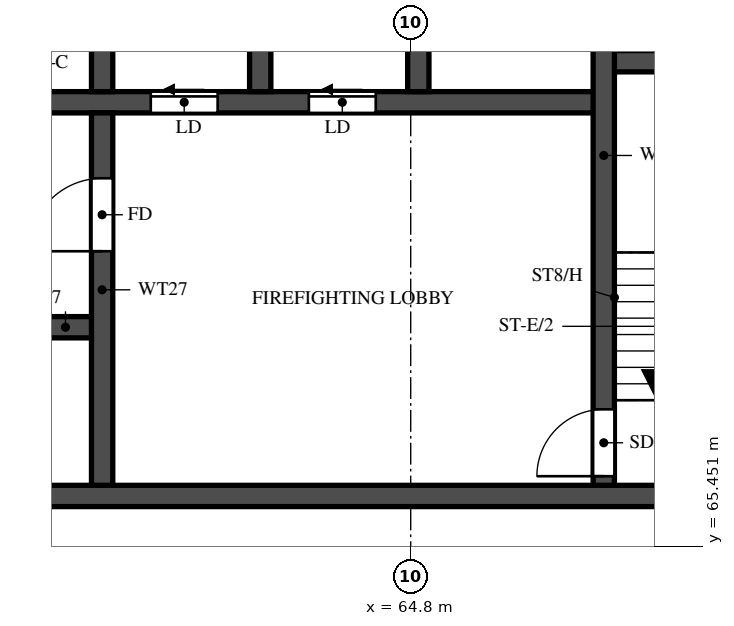
"""IFC4 building model, lengths in metres.
Left out: names, types, materials, properties, quantities, classifications, styles, units other than length and angle.
Written with IfcOpenShell. Run it as: python <this file> out.ifc"""

import sys

from ifc_helpers import new_model, si_unit, direction, frame, frame_2d, origin, place, context, subcontext, project, spatial, rectangle, extrude, element, fill, save


model = new_model("IFC4")
c1 = context("Model", 3, precision=1e-05, world=origin(), true_north=direction((0.0, 1.0)))
c2 = subcontext(c1, "Body", "Model", "MODEL_VIEW")
j1 = project(units=[si_unit("LENGTHUNIT", "METRE"), si_unit("PLANEANGLEUNIT", "RADIAN")], contexts=[c1])
p1 = place(None, origin())
s1 = spatial("IfcSite", under=j1, at=p1, CompositionType="ELEMENT")
p2 = place(p1, origin())
s2 = spatial("IfcBuilding", under=s1, at=p2, CompositionType="ELEMENT")
p3 = place(p2, frame((0.0, 0.0, 192.0)))
s3 = spatial("IfcBuildingStorey", under=s2, at=p3, CompositionType="ELEMENT", Elevation=192.0)
p4 = place(p3, frame((29.7, 66.275, 0.0), z_axis=(0.0, 0.0, 1.0), x_axis=(1.0, 0.0, 0.0)))
e1 = element("IfcWall", 1, at=p4, inside=s3, PredefinedType="SHEAR", context=c2, shape_type="SweptSolid", body=[
    extrude(rectangle(XDim=41.4, YDim=0.35, at=frame_2d((20.7, 0.0))), origin(), (0.0, 0.0, 1.0), 3.2),
])
p5 = place(p4, frame((0.925, 0.0, 0.0)))
e2 = element("IfcOpeningElement", 2, at=p5, cuts=e1, PredefinedType="OPENING", context=c2, shape_type="SweptSolid", body=[
    extrude(rectangle(XDim=1.1, YDim=2.1, at=frame_2d((0.55, 1.05))), frame((0.0, 0.185, 0.0), z_axis=(0.0, -1.0, 0.0), x_axis=(1.0, 0.0, 0.0)), (0.0, 0.0, 1.0), 0.37),
])
p6 = place(p4, frame((3.712, 0.0, 0.0)))
e3 = element("IfcOpeningElement", 3, at=p6, cuts=e1, PredefinedType="OPENING", context=c2, shape_type="SweptSolid", body=[
    extrude(rectangle(XDim=1.8, YDim=2.1, at=frame_2d((0.9, 1.05))), frame((0.0, 0.185, 0.0), z_axis=(0.0, -1.0, 0.0), x_axis=(1.0, 0.0, 0.0)), (0.0, 0.0, 1.0), 0.37),
])
p7 = place(p3, frame((35.625, 69.05, 0.0), z_axis=(0.0, 0.0, 1.0), x_axis=(1.0, 0.0, 0.0)))
e4 = element("IfcWall", 4, at=p7, inside=s3, PredefinedType="SHEAR", context=c2, shape_type="SweptSolid", body=[
    extrude(rectangle(XDim=24.1, YDim=0.35, at=frame_2d((12.05, 0.0))), origin(), (0.0, 0.0, 1.0), 3.2),
])
p8 = place(p7, frame((1.0, 0.0, 0.0)))
e5 = element("IfcOpeningElement", 5, at=p8, cuts=e4, PredefinedType="OPENING", context=c2, shape_type="SweptSolid", body=[
    extrude(rectangle(XDim=1.1, YDim=2.1, at=frame_2d((0.55, 1.05))), frame((0.0, 0.185, 0.0), z_axis=(0.0, -1.0, 0.0), x_axis=(1.0, 0.0, 0.0)), (0.0, 0.0, 1.0), 0.37),
])
p9 = place(p7, frame((3.75, 0.0, 0.0)))
e6 = element("IfcOpeningElement", 6, at=p9, cuts=e4, PredefinedType="OPENING", context=c2, shape_type="SweptSolid", body=[
    extrude(rectangle(XDim=1.1, YDim=2.1, at=frame_2d((0.55, 1.05))), frame((0.0, 0.185, 0.0), z_axis=(0.0, -1.0, 0.0), x_axis=(1.0, 0.0, 0.0)), (0.0, 0.0, 1.0), 0.37),
])
p10 = place(p7, frame((6.5, 0.0, 0.0)))
e7 = element("IfcOpeningElement", 7, at=p10, cuts=e4, PredefinedType="OPENING", context=c2, shape_type="SweptSolid", body=[
    extrude(rectangle(XDim=1.1, YDim=2.1, at=frame_2d((0.55, 1.05))), frame((0.0, 0.185, 0.0), z_axis=(0.0, -1.0, 0.0), x_axis=(1.0, 0.0, 0.0)), (0.0, 0.0, 1.0), 0.37),
])
p11 = place(p7, frame((9.25, 0.0, 0.0)))
e8 = element("IfcOpeningElement", 8, at=p11, cuts=e4, PredefinedType="OPENING", context=c2, shape_type="SweptSolid", body=[
    extrude(rectangle(XDim=1.1, YDim=2.1, at=frame_2d((0.55, 1.05))), frame((0.0, 0.185, 0.0), z_axis=(0.0, -1.0, 0.0), x_axis=(1.0, 0.0, 0.0)), (0.0, 0.0, 1.0), 0.37),
])
p12 = place(p7, frame((12.0, 0.0, 0.0)))
e9 = element("IfcOpeningElement", 9, at=p12, cuts=e4, PredefinedType="OPENING", context=c2, shape_type="SweptSolid", body=[
    extrude(rectangle(XDim=1.1, YDim=2.1, at=frame_2d((0.55, 1.05))), frame((0.0, 0.185, 0.0), z_axis=(0.0, -1.0, 0.0), x_axis=(1.0, 0.0, 0.0)), (0.0, 0.0, 1.0), 0.37),
])
p13 = place(p7, frame((14.75, 0.0, 0.0)))
e10 = element("IfcOpeningElement", 10, at=p13, cuts=e4, PredefinedType="OPENING", context=c2, shape_type="SweptSolid", body=[
    extrude(rectangle(XDim=1.1, YDim=2.1, at=frame_2d((0.55, 1.05))), frame((0.0, 0.185, 0.0), z_axis=(0.0, -1.0, 0.0), x_axis=(1.0, 0.0, 0.0)), (0.0, 0.0, 1.0), 0.37),
])
p14 = place(p7, frame((17.625, 0.0, 0.0)))
e11 = element("IfcOpeningElement", 11, at=p14, cuts=e4, PredefinedType="OPENING", context=c2, shape_type="SweptSolid", body=[
    extrude(rectangle(XDim=1.1, YDim=2.1, at=frame_2d((0.55, 1.05))), frame((0.0, 0.185, 0.0), z_axis=(0.0, -1.0, 0.0), x_axis=(1.0, 0.0, 0.0)), (0.0, 0.0, 1.0), 0.37),
])
p15 = place(p7, frame((20.625, 0.0, 0.0)))
e12 = element("IfcOpeningElement", 12, at=p15, cuts=e4, PredefinedType="OPENING", context=c2, shape_type="SweptSolid", body=[
    extrude(rectangle(XDim=1.1, YDim=2.1, at=frame_2d((0.55, 1.05))), frame((0.0, 0.185, 0.0), z_axis=(0.0, -1.0, 0.0), x_axis=(1.0, 0.0, 0.0)), (0.0, 0.0, 1.0), 0.37),
])
p16 = place(p3, frame((32.825, 72.75, 0.0), z_axis=(0.0, 0.0, 1.0), x_axis=(1.0, 0.0, 0.0)))
e13 = element("IfcWall", 13, at=p16, inside=s3, PredefinedType="SHEAR", context=c2, shape_type="SweptSolid", body=[
    extrude(rectangle(XDim=35.15, YDim=0.35, at=frame_2d((17.575, 0.0))), origin(), (0.0, 0.0, 1.0), 3.2),
])
p17 = place(p16, frame((19.8, 0.0, 0.0)))
e14 = element("IfcOpeningElement", 14, at=p17, cuts=e13, PredefinedType="OPENING", context=c2, shape_type="SweptSolid", body=[
    extrude(rectangle(XDim=1.1, YDim=2.1, at=frame_2d((0.55, 1.05))), frame((0.0, 0.185, 0.0), z_axis=(0.0, -1.0, 0.0), x_axis=(1.0, 0.0, 0.0)), (0.0, 0.0, 1.0), 0.37),
])
p18 = place(p16, frame((27.7, 0.0, 0.0)))
e15 = element("IfcOpeningElement", 15, at=p18, cuts=e13, PredefinedType="OPENING", context=c2, shape_type="SweptSolid", body=[
    extrude(rectangle(XDim=1.1, YDim=2.1, at=frame_2d((0.55, 1.05))), frame((0.0, 0.185, 0.0), z_axis=(0.0, -1.0, 0.0), x_axis=(1.0, 0.0, 0.0)), (0.0, 0.0, 1.0), 0.37),
])
p19 = place(p16, frame((30.3, 0.0, 0.0)))
e16 = element("IfcOpeningElement", 16, at=p19, cuts=e13, PredefinedType="OPENING", context=c2, shape_type="SweptSolid", body=[
    extrude(rectangle(XDim=1.1, YDim=2.1, at=frame_2d((0.55, 1.05))), frame((0.0, 0.185, 0.0), z_axis=(0.0, -1.0, 0.0), x_axis=(1.0, 0.0, 0.0)), (0.0, 0.0, 1.0), 0.37),
])
p20 = place(p16, frame((3.8, 0.0, 0.0)))
e17 = element("IfcOpeningElement", 17, at=p20, cuts=e13, PredefinedType="OPENING", context=c2, shape_type="SweptSolid", body=[
    extrude(rectangle(XDim=1.1, YDim=2.1, at=frame_2d((0.55, 1.05))), frame((0.0, 0.185, 0.0), z_axis=(0.0, -1.0, 0.0), x_axis=(1.0, 0.0, 0.0)), (0.0, 0.0, 1.0), 0.37),
])
p21 = place(p16, frame((6.55, 0.0, 0.0)))
e18 = element("IfcOpeningElement", 18, at=p21, cuts=e13, PredefinedType="OPENING", context=c2, shape_type="SweptSolid", body=[
    extrude(rectangle(XDim=1.1, YDim=2.1, at=frame_2d((0.55, 1.05))), frame((0.0, 0.185, 0.0), z_axis=(0.0, -1.0, 0.0), x_axis=(1.0, 0.0, 0.0)), (0.0, 0.0, 1.0), 0.37),
])
p22 = place(p16, frame((9.3, 0.0, 0.0)))
e19 = element("IfcOpeningElement", 19, at=p22, cuts=e13, PredefinedType="OPENING", context=c2, shape_type="SweptSolid", body=[
    extrude(rectangle(XDim=1.1, YDim=2.1, at=frame_2d((0.55, 1.05))), frame((0.0, 0.185, 0.0), z_axis=(0.0, -1.0, 0.0), x_axis=(1.0, 0.0, 0.0)), (0.0, 0.0, 1.0), 0.37),
])
p23 = place(p16, frame((12.05, 0.0, 0.0)))
e20 = element("IfcOpeningElement", 20, at=p23, cuts=e13, PredefinedType="OPENING", context=c2, shape_type="SweptSolid", body=[
    extrude(rectangle(XDim=1.1, YDim=2.1, at=frame_2d((0.55, 1.05))), frame((0.0, 0.185, 0.0), z_axis=(0.0, -1.0, 0.0), x_axis=(1.0, 0.0, 0.0)), (0.0, 0.0, 1.0), 0.37),
])
p24 = place(p16, frame((14.8, 0.0, 0.0)))
e21 = element("IfcOpeningElement", 21, at=p24, cuts=e13, PredefinedType="OPENING", context=c2, shape_type="SweptSolid", body=[
    extrude(rectangle(XDim=1.1, YDim=2.1, at=frame_2d((0.55, 1.05))), frame((0.0, 0.185, 0.0), z_axis=(0.0, -1.0, 0.0), x_axis=(1.0, 0.0, 0.0)), (0.0, 0.0, 1.0), 0.37),
])
p25 = place(p16, frame((17.55, 0.0, 0.0)))
e22 = element("IfcOpeningElement", 22, at=p25, cuts=e13, PredefinedType="OPENING", context=c2, shape_type="SweptSolid", body=[
    extrude(rectangle(XDim=1.1, YDim=2.1, at=frame_2d((0.55, 1.05))), frame((0.0, 0.185, 0.0), z_axis=(0.0, -1.0, 0.0), x_axis=(1.0, 0.0, 0.0)), (0.0, 0.0, 1.0), 0.37),
])
p26 = place(p16, frame((0.938, 0.0, 0.0)))
e23 = element("IfcOpeningElement", 23, at=p26, cuts=e13, PredefinedType="OPENING", context=c2, shape_type="SweptSolid", body=[
    extrude(rectangle(XDim=1.1, YDim=2.1, at=frame_2d((0.55, 1.05))), frame((0.0, 0.185, 0.0), z_axis=(0.0, -1.0, 0.0), x_axis=(1.0, 0.0, 0.0)), (0.0, 0.0, 1.0), 0.37),
])
p27 = place(p3, frame((67.975, 73.425, 0.0), z_axis=(0.0, 0.0, 1.0), x_axis=(1.0, 0.0, 0.0)))
e24 = element("IfcWall", 24, at=p27, inside=s3, PredefinedType="SHEAR", context=c2, shape_type="SweptSolid", body=[
    extrude(rectangle(XDim=3.125, YDim=0.35, at=frame_2d((1.562, 0.0))), origin(), (0.0, 0.0, 1.0), 3.2),
])
p28 = place(p3, frame((67.975, 66.45, 0.0), z_axis=(0.0, 0.0, 1.0), x_axis=(0.0, 1.0, 0.0)))
e25 = element("IfcWall", 25, at=p28, inside=s3, PredefinedType="SHEAR", context=c2, shape_type="SweptSolid", body=[
    extrude(rectangle(XDim=10.85, YDim=0.35, at=frame_2d((5.425, 0.0))), origin(), (0.0, 0.0, 1.0), 3.2),
])
p29 = place(p28, frame((0.15, 0.0, 0.0)))
e26 = element("IfcOpeningElement", 26, at=p29, cuts=e25, PredefinedType="OPENING", context=c2, shape_type="SweptSolid", body=[
    extrude(rectangle(XDim=1.1, YDim=2.1, at=frame_2d((0.55, 1.05))), frame((0.0, 0.185, 0.0), z_axis=(0.0, -1.0, 0.0), x_axis=(1.0, 0.0, 0.0)), (0.0, 0.0, 1.0), 0.37),
])
p30 = place(p3, frame((59.725, 66.45, 0.0), z_axis=(0.0, 0.0, 1.0), x_axis=(0.0, 1.0, 0.0)))
e27 = element("IfcWall", 27, at=p30, inside=s3, PredefinedType="SHEAR", context=c2, shape_type="SweptSolid", body=[
    extrude(rectangle(XDim=6.125, YDim=0.35, at=frame_2d((3.062, 0.0))), origin(), (0.0, 0.0, 1.0), 3.2),
])
p31 = place(p30, frame((3.85, 0.0, 0.0)))
e28 = element("IfcOpeningElement", 28, at=p31, cuts=e27, PredefinedType="OPENING", context=c2, shape_type="SweptSolid", body=[
    extrude(rectangle(XDim=1.2, YDim=2.1, at=frame_2d((0.6, 1.05))), frame((0.0, 0.185, 0.0), z_axis=(0.0, -1.0, 0.0), x_axis=(1.0, 0.0, 0.0)), (0.0, 0.0, 1.0), 0.37),
])
for number, where, z_axis, x_axis in (
    (29, (59.725, 72.925, 0.0), (0.0, 0.0, 1.0), (0.0, 1.0, 0.0)),
    (30, (62.325, 72.925, 0.0), (0.0, 0.0, 1.0), (0.0, 1.0, 0.0)),
    (31, (64.925, 72.925, 0.0), (0.0, 0.0, 1.0), (0.0, 1.0, 0.0)),
):
    element("IfcWall", number, at=place(p3, frame(where, z_axis=z_axis, x_axis=x_axis)), inside=s3, PredefinedType="SHEAR", context=c2, shape_type="SweptSolid", body=[
        extrude(rectangle(XDim=2.95, YDim=0.35, at=frame_2d((1.475, 0.0))), origin(), (0.0, 0.0, 1.0), 3.2),
    ])
p32 = place(p29, origin())
e32 = element("IfcDoor", 32, at=p32, inside=s3, OperationType="SINGLE_SWING_LEFT", PredefinedType="DOOR", context=c2, shape_type="SweptSolid", body=[
    extrude(rectangle(XDim=1.1, YDim=2.1, at=frame_2d((0.55, 1.05))), frame((0.0, 0.025, 0.0), z_axis=(0.0, -1.0, 0.0), x_axis=(1.0, 0.0, 0.0)), (0.0, 0.0, 1.0), 0.05),
])
fill(e26, e32)
p33 = place(p31, origin())
e33 = element("IfcDoor", 33, at=p33, inside=s3, OperationType="SINGLE_SWING_LEFT", PredefinedType="DOOR", context=c2, shape_type="SweptSolid", body=[
    extrude(rectangle(XDim=1.2, YDim=2.1, at=frame_2d((0.6, 1.05))), frame((0.0, 0.025, 0.0), z_axis=(0.0, -1.0, 0.0), x_axis=(1.0, 0.0, 0.0)), (0.0, 0.0, 1.0), 0.05),
])
fill(e28, e33)
p34 = place(p18, origin())
e34 = element("IfcDoor", 34, at=p34, inside=s3, OperationType="SLIDING_TO_LEFT", PredefinedType="DOOR", context=c2, shape_type="SweptSolid", body=[
    extrude(rectangle(XDim=1.1, YDim=2.1, at=frame_2d((0.55, 1.05))), frame((0.0, 0.025, 0.0), z_axis=(0.0, -1.0, 0.0), x_axis=(1.0, 0.0, 0.0)), (0.0, 0.0, 1.0), 0.05),
])
fill(e15, e34)
p35 = place(p19, origin())
e35 = element("IfcDoor", 35, at=p35, inside=s3, OperationType="SLIDING_TO_LEFT", PredefinedType="DOOR", context=c2, shape_type="SweptSolid", body=[
    extrude(rectangle(XDim=1.1, YDim=2.1, at=frame_2d((0.55, 1.05))), frame((0.0, 0.025, 0.0), z_axis=(0.0, -1.0, 0.0), x_axis=(1.0, 0.0, 0.0)), (0.0, 0.0, 1.0), 0.05),
])
fill(e16, e35)
save(model, sys.argv[1])
